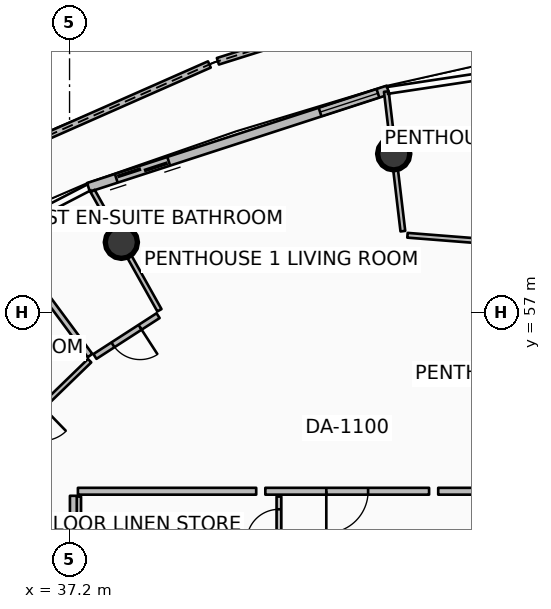
"""IFC4 building model, lengths in metres.
Left out: names, types, materials, properties, quantities, classifications, styles, units other than length and angle.
Written with IfcOpenShell. Run it as: python <this file> out.ifc"""

import sys

from ifc_helpers import new_model, si_unit, direction, frame, frame_2d, origin, origin_2d, place, context, subcontext, project, spatial, polyline, rectangle, circle, outline, extrude, element, fill, save


model = new_model("IFC4")
c1 = context("Model", 3, precision=1e-05, world=origin(), true_north=direction((0.0, 1.0)))
c2 = subcontext(c1, "Body", "Model", "MODEL_VIEW")
j1 = project(units=[si_unit("LENGTHUNIT", "METRE"), si_unit("PLANEANGLEUNIT", "RADIAN")], contexts=[c1])
p1 = place(None, origin())
s1 = spatial("IfcSite", under=j1, at=p1, CompositionType="ELEMENT")
p2 = place(p1, origin())
s2 = spatial("IfcBuilding", under=s1, at=p2, CompositionType="ELEMENT")
p3 = place(p2, frame((0.0, 0.0, 317.9)))
s3 = spatial("IfcBuildingStorey", under=s2, at=p3, CompositionType="ELEMENT", Elevation=317.9)
p4 = place(p3, frame((45.73, 61.179, 0.0), z_axis=(0.0, 0.0, 1.0), x_axis=(1.0, 0.0, 0.0)))
e1 = element("IfcColumn", 1, at=p4, inside=s3, PredefinedType="COLUMN", context=c2, shape_type="SweptSolid", body=[
    extrude(circle(Radius=0.425, at=origin_2d()), origin(), (0.0, 0.0, 1.0), 4.196),
])
p5 = place(p3, frame((38.563, 58.851, 0.0), z_axis=(0.0, 0.0, 1.0), x_axis=(1.0, 0.0, 0.0)))
e2 = element("IfcColumn", 2, at=p5, inside=s3, PredefinedType="COLUMN", context=c2, shape_type="SweptSolid", body=[
    extrude(circle(Radius=0.425, at=origin_2d()), origin(), (0.0, 0.0, 1.0), 3.94),
])
p6 = place(p3, frame((49.766, 66.337, 0.0), z_axis=(0.0, 0.0, 1.0), x_axis=(-0.953971961219, -0.299895810587, 0.0)))
e3 = element("IfcWall", 3, at=p6, inside=s3, PredefinedType="PARAPET", context=c2, shape_type="SweptSolid", body=[
    extrude(outline(polyline([(0.0, 0.0), (9.08, 0.0), (9.08, 1.348), (4.54, 1.562), (0.0, 1.747), (0.0, 0.0)])), frame((0.0, 0.09, 0.0), z_axis=(0.0, -1.0, 0.0), x_axis=(1.0, 0.0, 0.0)), (0.0, 0.0, 1.0), 0.18),
])
p7 = place(p3, frame((40.879, 63.529, 0.0), z_axis=(0.0, 0.0, 1.0), x_axis=(-0.914812827608, -0.403878063831, 0.0)))
e4 = element("IfcWall", 4, at=p7, inside=s3, PredefinedType="PARAPET", context=c2, shape_type="SweptSolid", body=[
    extrude(outline(polyline([(0.0, 0.0), (8.793, 0.0), (8.794, 1.12), (4.397, 1.182), (0.0, 1.348), (0.0, 0.0)])), frame((0.0, 0.09, 0.0), z_axis=(0.0, -1.0, 0.0), x_axis=(1.0, 0.0, 0.0)), (0.0, 0.0, 1.0), 0.18),
])
p8 = place(p3, frame((45.581, 62.857, 0.0), z_axis=(0.0, 0.0, 1.0), x_axis=(-0.951053547111, -0.309026132434, 0.0)))
e5 = element("IfcWall", 5, at=p8, inside=s3, PredefinedType="SOLIDWALL", context=c2, shape_type="SweptSolid", body=[
    extrude(rectangle(XDim=8.289, YDim=0.24, at=frame_2d((4.145, 0.0))), origin(), (0.0, 0.0, 1.0), 2.89),
])
p9 = place(p8, frame((6.069, 0.0, 0.0)))
e6 = element("IfcOpeningElement", 6, at=p9, cuts=e5, PredefinedType="OPENING", context=c2, shape_type="SweptSolid", body=[
    extrude(rectangle(XDim=1.45, YDim=2.15, at=frame_2d((0.725, 1.075))), frame((0.0, 0.13, 0.0), z_axis=(0.0, -1.0, 0.0), x_axis=(1.0, 0.0, 0.0)), (0.0, 0.0, 1.0), 0.26),
])
p10 = place(p8, frame((0.28, 0.0, 0.65)))
e7 = element("IfcOpeningElement", 7, at=p10, cuts=e5, PredefinedType="OPENING", context=c2, shape_type="SweptSolid", body=[
    extrude(rectangle(XDim=1.6, YDim=1.5, at=frame_2d((0.8, 0.75))), frame((0.0, 0.13, 0.0), z_axis=(0.0, -1.0, 0.0), x_axis=(1.0, 0.0, 0.0)), (0.0, 0.0, 1.0), 0.26),
])
p11 = place(p3, frame((37.44, 50.62, 0.0), z_axis=(0.0, 0.0, 1.0), x_axis=(0.0, 1.0, 0.0)))
e8 = element("IfcWall", 8, at=p11, inside=s3, PredefinedType="PARTITIONING", context=c2, shape_type="SweptSolid", body=[
    extrude(rectangle(XDim=1.54, YDim=0.125, at=frame_2d((0.77, 0.0))), origin(), (0.0, 0.0, 1.0), 3.38),
])
p12 = place(p3, frame((42.71, 50.64, 0.0), z_axis=(0.0, 0.0, 1.0), x_axis=(0.0, 1.0, 0.0)))
e9 = element("IfcWall", 9, at=p12, inside=s3, PredefinedType="PARTITIONING", context=c2, shape_type="SweptSolid", body=[
    extrude(rectangle(XDim=1.52, YDim=0.125, at=frame_2d((0.76, 0.0))), origin(), (0.0, 0.0, 1.0), 3.38),
])
p13 = place(p12, frame((0.335, 0.0, 0.0)))
e10 = element("IfcOpeningElement", 10, at=p13, cuts=e9, PredefinedType="OPENING", context=c2, shape_type="SweptSolid", body=[
    extrude(rectangle(XDim=0.85, YDim=2.06, at=frame_2d((0.425, 1.03))), frame((0.0, 0.073, 0.0), z_axis=(0.0, -1.0, 0.0), x_axis=(1.0, 0.0, 0.0)), (0.0, 0.0, 1.0), 0.145),
])
p14 = place(p3, frame((46.661, 52.3, 0.0), z_axis=(0.0, 0.0, 1.0), x_axis=(-1.0, 0.0, 0.0)))
e11 = element("IfcWall", 11, at=p14, inside=s3, PredefinedType="PARTITIONING", context=c2, shape_type="SweptSolid", body=[
    extrude(rectangle(XDim=4.309, YDim=0.18, at=frame_2d((2.155, 0.0))), origin(), (0.0, 0.0, 1.0), 3.38),
])
p15 = place(p14, frame((1.604, 0.0, 0.0)))
e12 = element("IfcOpeningElement", 12, at=p15, cuts=e11, PredefinedType="OPENING", context=c2, shape_type="SweptSolid", body=[
    extrude(rectangle(XDim=1.1, YDim=2.1, at=frame_2d((0.55, 1.05))), frame((0.0, 0.1, 0.0), z_axis=(0.0, -1.0, 0.0), x_axis=(1.0, 0.0, 0.0)), (0.0, 0.0, 1.0), 0.2),
])
p16 = place(p3, frame((50.785, 52.3, 0.0), z_axis=(0.0, 0.0, 1.0), x_axis=(-1.0, 0.0, 0.0)))
e13 = element("IfcWall", 13, at=p16, inside=s3, PredefinedType="PARTITIONING", context=c2, shape_type="SweptSolid", body=[
    extrude(rectangle(XDim=3.884, YDim=0.18, at=frame_2d((1.942, 0.0))), origin(), (0.0, 0.0, 1.0), 3.38),
])
p17 = place(p3, frame((45.971, 59.143, 0.0), z_axis=(0.0, 0.0, 1.0), x_axis=(-0.117541965763, 0.99306791625, 0.0)))
e14 = element("IfcWall", 14, at=p17, inside=s3, PredefinedType="PARTITIONING", context=c2, shape_type="SweptSolid", body=[
    extrude(rectangle(XDim=3.699, YDim=0.125, at=frame_2d((1.85, 0.0))), origin(), (0.0, 0.0, 1.0), 3.38),
])
p18 = place(p3, frame((52.549, 58.527, 0.0), z_axis=(0.0, 0.0, 1.0), x_axis=(-0.996915635348, 0.078480672772, 0.0)))
e15 = element("IfcWall", 15, at=p18, inside=s3, PredefinedType="PARTITIONING", context=c2, shape_type="SweptSolid", body=[
    extrude(rectangle(XDim=6.477, YDim=0.125, at=frame_2d((3.238, 0.0))), origin(), (0.0, 0.0, 1.0), 3.38),
])
p19 = place(p18, frame((2.788, 0.0, 0.0)))
e16 = element("IfcOpeningElement", 16, at=p19, cuts=e15, PredefinedType="OPENING", context=c2, shape_type="SweptSolid", body=[
    extrude(rectangle(XDim=0.9, YDim=2.08, at=frame_2d((0.45, 1.04))), frame((0.0, 0.073, 0.0), z_axis=(0.0, -1.0, 0.0), x_axis=(1.0, 0.0, 0.0)), (0.0, 0.0, 1.0), 0.145),
])
p20 = place(p3, frame((42.112, 52.3, 0.0), z_axis=(0.0, 0.0, 1.0), x_axis=(-1.0, 0.0, 0.0)))
e17 = element("IfcWall", 17, at=p20, inside=s3, PredefinedType="PARTITIONING", context=c2, shape_type="SweptSolid", body=[
    extrude(rectangle(XDim=4.692, YDim=0.18, at=frame_2d((2.346, 0.0))), origin(), (0.0, 0.0, 1.0), 3.38),
])
p21 = place(p3, frame((37.3, 52.18, 0.0), z_axis=(0.0, 0.0, 1.0), x_axis=(0.0, -1.0, 0.0)))
e18 = element("IfcWall", 18, at=p21, inside=s3, PredefinedType="PARTITIONING", context=c2, shape_type="SweptSolid", body=[
    extrude(rectangle(XDim=1.625, YDim=0.18, at=frame_2d((0.812, 0.0))), origin(), (0.0, 0.0, 1.0), 3.38),
])
p22 = place(p3, frame((39.565, 57.062, 0.0), z_axis=(0.0, 0.0, 1.0), x_axis=(-0.488617828282, 0.872497918556, 0.0)))
e19 = element("IfcWall", 19, at=p22, inside=s3, PredefinedType="PARTITIONING", context=c2, shape_type="SweptSolid", body=[
    extrude(rectangle(XDim=3.599, YDim=0.125, at=frame_2d((1.8, 0.0))), origin(), (0.0, 0.0, 1.0), 3.38),
])
p23 = place(p3, frame((39.53, 56.92, 0.0), z_axis=(0.0, 0.0, 1.0), x_axis=(-0.839824942878, -0.542857315802, 0.0)))
e20 = element("IfcWall", 20, at=p23, inside=s3, PredefinedType="PARTITIONING", context=c2, shape_type="SweptSolid", body=[
    extrude(rectangle(XDim=1.979, YDim=0.15, at=frame_2d((0.989, 0.0))), origin(), (0.0, 0.0, 1.0), 3.38),
])
p24 = place(p23, frame((0.564, 0.0, 0.0)))
e21 = element("IfcOpeningElement", 21, at=p24, cuts=e20, PredefinedType="OPENING", context=c2, shape_type="SweptSolid", body=[
    extrude(rectangle(XDim=0.85, YDim=2.06, at=frame_2d((0.425, 1.03))), frame((0.0, 0.085, 0.0), z_axis=(0.0, -1.0, 0.0), x_axis=(1.0, 0.0, 0.0)), (0.0, 0.0, 1.0), 0.17),
])
p25 = place(p3, frame((37.739, 55.87, 0.0), z_axis=(0.0, 0.0, 1.0), x_axis=(-0.594773749171, 0.803893144203, 0.0)))
e22 = element("IfcWall", 22, at=p25, inside=s3, PredefinedType="PARTITIONING", context=c2, shape_type="SweptSolid", body=[
    extrude(rectangle(XDim=3.964, YDim=0.15, at=frame_2d((1.982, 0.0))), origin(), (0.0, 0.0, 1.0), 3.38),
])
p26 = place(p3, frame((37.728, 55.735, 0.0), z_axis=(0.0, 0.0, 1.0), x_axis=(-0.717843655189, -0.696204342636, 0.0)))
e23 = element("IfcWall", 23, at=p26, inside=s3, PredefinedType="PARTITIONING", context=c2, shape_type="SweptSolid", body=[
    extrude(rectangle(XDim=4.366, YDim=0.125, at=frame_2d((2.183, 0.0))), origin(), (0.0, 0.0, 1.0), 3.38),
])
p27 = place(p26, frame((1.733, 0.0, 0.0)))
e24 = element("IfcOpeningElement", 24, at=p27, cuts=e23, PredefinedType="OPENING", context=c2, shape_type="SweptSolid", body=[
    extrude(rectangle(XDim=0.9, YDim=2.08, at=frame_2d((0.45, 1.04))), frame((0.0, 0.073, 0.0), z_axis=(0.0, -1.0, 0.0), x_axis=(1.0, 0.0, 0.0)), (0.0, 0.0, 1.0), 0.145),
])
p28 = place(p9, origin())
e25 = element("IfcDoor", 25, at=p28, inside=s3, OperationType="DOUBLE_DOOR_SLIDING", PredefinedType="DOOR", context=c2, shape_type="SweptSolid", body=[
    extrude(rectangle(XDim=1.45, YDim=2.15, at=frame_2d((0.725, 1.075))), frame((0.0, 0.025, 0.0), z_axis=(0.0, -1.0, 0.0), x_axis=(1.0, 0.0, 0.0)), (0.0, 0.0, 1.0), 0.05),
])
fill(e6, e25)
p29 = place(p10, origin())
e26 = element("IfcWindow", 26, at=p29, inside=s3, PartitioningType="SINGLE_PANEL", PredefinedType="WINDOW", context=c2, shape_type="SweptSolid", body=[
    extrude(rectangle(XDim=1.6, YDim=1.5, at=frame_2d((0.8, 0.75))), frame((0.0, 0.03, 0.0), z_axis=(0.0, -1.0, 0.0), x_axis=(1.0, 0.0, 0.0)), (0.0, 0.0, 1.0), 0.06),
])
fill(e7, e26)
p30 = place(p13, origin())
e27 = element("IfcDoor", 27, at=p30, inside=s3, OperationType="SINGLE_SWING_LEFT", PredefinedType="DOOR", context=c2, shape_type="SweptSolid", body=[
    extrude(rectangle(XDim=0.85, YDim=2.06, at=frame_2d((0.425, 1.03))), frame((0.0, 0.025, 0.0), z_axis=(0.0, -1.0, 0.0), x_axis=(1.0, 0.0, 0.0)), (0.0, 0.0, 1.0), 0.05),
])
fill(e10, e27)
p31 = place(p15, origin())
e28 = element("IfcDoor", 28, at=p31, inside=s3, OperationType="SINGLE_SWING_RIGHT", PredefinedType="DOOR", context=c2, shape_type="SweptSolid", body=[
    extrude(rectangle(XDim=1.1, YDim=2.1, at=frame_2d((0.55, 1.05))), frame((0.0, 0.025, 0.0), z_axis=(0.0, -1.0, 0.0), x_axis=(1.0, 0.0, 0.0)), (0.0, 0.0, 1.0), 0.05),
])
fill(e12, e28)
p32 = place(p24, origin())
e29 = element("IfcDoor", 29, at=p32, inside=s3, OperationType="SINGLE_SWING_LEFT", PredefinedType="DOOR", context=c2, shape_type="SweptSolid", body=[
    extrude(rectangle(XDim=0.85, YDim=2.06, at=frame_2d((0.425, 1.03))), frame((0.0, 0.025, 0.0), z_axis=(0.0, -1.0, 0.0), x_axis=(1.0, 0.0, 0.0)), (0.0, 0.0, 1.0), 0.05),
])
fill(e21, e29)
save(model, sys.argv[1])
